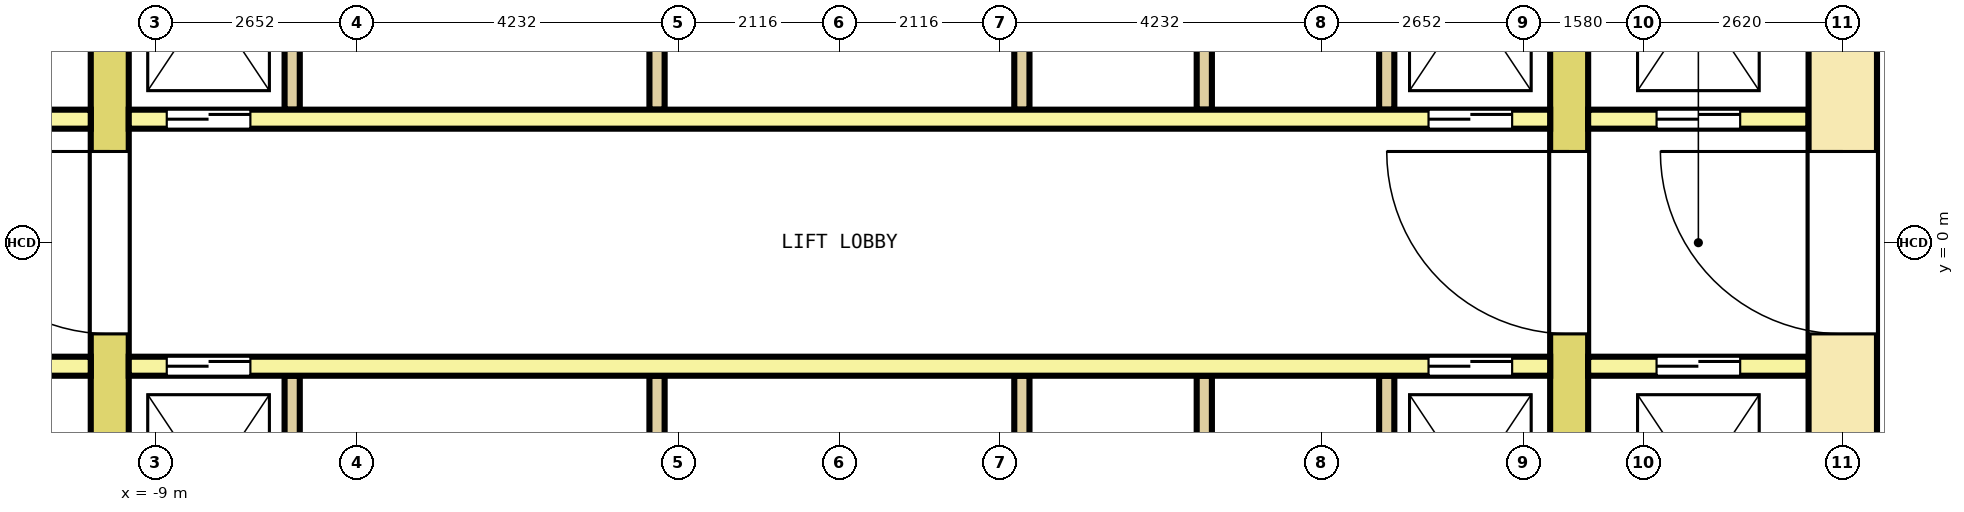
"""IFC4 building model, lengths in metres.
Left out: names, types, materials, properties, quantities, classifications, styles, units other than length and angle.
Written with IfcOpenShell. Run it as: python <this file> out.ifc"""

import sys

from ifc_helpers import new_model, si_unit, direction, frame, frame_2d, origin, place, context, subcontext, project, spatial, rectangle, extrude, element, fill, save


model = new_model("IFC4")
c1 = context("Model", 3, precision=1e-05, world=origin(), true_north=direction((0.0, 1.0)))
c2 = subcontext(c1, "Body", "Model", "MODEL_VIEW")
j1 = project(units=[si_unit("LENGTHUNIT", "METRE"), si_unit("PLANEANGLEUNIT", "RADIAN")], contexts=[c1])
p1 = place(None, origin())
s1 = spatial("IfcSite", under=j1, at=p1, CompositionType="ELEMENT")
p2 = place(p1, origin())
s2 = spatial("IfcBuilding", under=s1, at=p2, CompositionType="ELEMENT")
p3 = place(p2, frame((0.0, 0.0, 54.2)))
s3 = spatial("IfcBuildingStorey", under=s2, at=p3, CompositionType="ELEMENT", Elevation=54.2)
p4 = place(p3, frame((13.2, -10.35, 0.0), z_axis=(0.0, 0.0, 1.0), x_axis=(0.0, 1.0, 0.0)))
e1 = element("IfcWall", 1, at=p4, inside=s3, PredefinedType="SHEAR", context=c2, shape_type="SweptSolid", body=[
    extrude(rectangle(XDim=20.7, YDim=0.9, at=frame_2d((10.35, 0.0))), origin(), (0.0, 0.0, 1.0), 4.1),
])
p5 = place(p4, frame((9.15, 0.0, 0.0)))
e2 = element("IfcOpeningElement", 2, at=p5, cuts=e1, PredefinedType="OPENING", context=c2, shape_type="SweptSolid", body=[
    extrude(rectangle(XDim=2.4, YDim=2.1, at=frame_2d((1.2, 1.05))), frame((0.0, 0.46, 0.0), z_axis=(0.0, -1.0, 0.0), x_axis=(1.0, 0.0, 0.0)), (0.0, 0.0, 1.0), 0.92),
])
p6 = place(p4, frame((16.05, 0.0, 0.0)))
e3 = element("IfcOpeningElement", 3, at=p6, cuts=e1, PredefinedType="OPENING", context=c2, shape_type="SweptSolid", body=[
    extrude(rectangle(XDim=1.2, YDim=2.1, at=frame_2d((0.6, 1.05))), frame((0.0, 0.46, 0.0), z_axis=(0.0, -1.0, 0.0), x_axis=(1.0, 0.0, 0.0)), (0.0, 0.0, 1.0), 0.92),
])
p7 = place(p4, frame((2.819, 0.0, 0.0)))
e4 = element("IfcOpeningElement", 4, at=p7, cuts=e1, PredefinedType="OPENING", context=c2, shape_type="SweptSolid", body=[
    extrude(rectangle(XDim=1.0, YDim=2.1, at=frame_2d((0.5, 1.05))), frame((0.0, 0.46, 0.0), z_axis=(0.0, -1.0, 0.0), x_axis=(1.0, 0.0, 0.0)), (0.0, 0.0, 1.0), 0.92),
])
p8 = place(p4, frame((4.281, 0.0, 0.0)))
e5 = element("IfcOpeningElement", 5, at=p8, cuts=e1, PredefinedType="OPENING", context=c2, shape_type="SweptSolid", body=[
    extrude(rectangle(XDim=1.0, YDim=2.1, at=frame_2d((0.5, 1.05))), frame((0.0, 0.46, 0.0), z_axis=(0.0, -1.0, 0.0), x_axis=(1.0, 0.0, 0.0)), (0.0, 0.0, 1.0), 0.92),
])
p9 = place(p3, frame((-9.6, -7.7, 0.0), z_axis=(0.0, 0.0, 1.0), x_axis=(0.0, 1.0, 0.0)))
e6 = element("IfcWall", 6, at=p9, inside=s3, PredefinedType="SHEAR", context=c2, shape_type="SweptSolid", body=[
    extrude(rectangle(XDim=15.4, YDim=0.5, at=frame_2d((7.7, 0.0))), origin(), (0.0, 0.0, 1.0), 4.1),
])
p10 = place(p9, frame((6.5, 0.0, 0.0)))
e7 = element("IfcOpeningElement", 7, at=p10, cuts=e6, PredefinedType="OPENING", context=c2, shape_type="SweptSolid", body=[
    extrude(rectangle(XDim=2.4, YDim=2.1, at=frame_2d((1.2, 1.05))), frame((0.0, 0.26, 0.0), z_axis=(0.0, -1.0, 0.0), x_axis=(1.0, 0.0, 0.0)), (0.0, 0.0, 1.0), 0.52),
])
p11 = place(p9, frame((13.4, 0.0, 0.0)))
e8 = element("IfcOpeningElement", 8, at=p11, cuts=e6, PredefinedType="OPENING", context=c2, shape_type="SweptSolid", body=[
    extrude(rectangle(XDim=1.2, YDim=2.1, at=frame_2d((0.6, 1.05))), frame((0.0, 0.26, 0.0), z_axis=(0.0, -1.0, 0.0), x_axis=(1.0, 0.0, 0.0)), (0.0, 0.0, 1.0), 0.52),
])
p12 = place(p9, frame((0.8, 0.0, 0.0)))
e9 = element("IfcOpeningElement", 9, at=p12, cuts=e6, PredefinedType="OPENING", context=c2, shape_type="SweptSolid", body=[
    extrude(rectangle(XDim=1.2, YDim=2.1, at=frame_2d((0.6, 1.05))), frame((0.0, 0.26, 0.0), z_axis=(0.0, -1.0, 0.0), x_axis=(1.0, 0.0, 0.0)), (0.0, 0.0, 1.0), 0.52),
])
p13 = place(p3, frame((9.6, -7.7, 0.0), z_axis=(0.0, 0.0, 1.0), x_axis=(0.0, 1.0, 0.0)))
e10 = element("IfcWall", 10, at=p13, inside=s3, PredefinedType="SHEAR", context=c2, shape_type="SweptSolid", body=[
    extrude(rectangle(XDim=15.4, YDim=0.5, at=frame_2d((7.7, 0.0))), origin(), (0.0, 0.0, 1.0), 4.1),
])
p14 = place(p13, frame((6.5, 0.0, 0.0)))
e11 = element("IfcOpeningElement", 11, at=p14, cuts=e10, PredefinedType="OPENING", context=c2, shape_type="SweptSolid", body=[
    extrude(rectangle(XDim=2.4, YDim=2.1, at=frame_2d((1.2, 1.05))), frame((0.0, 0.26, 0.0), z_axis=(0.0, -1.0, 0.0), x_axis=(1.0, 0.0, 0.0)), (0.0, 0.0, 1.0), 0.52),
])
p15 = place(p13, frame((13.4, 0.0, 0.0)))
e12 = element("IfcOpeningElement", 12, at=p15, cuts=e10, PredefinedType="OPENING", context=c2, shape_type="SweptSolid", body=[
    extrude(rectangle(XDim=1.2, YDim=2.1, at=frame_2d((0.6, 1.05))), frame((0.0, 0.26, 0.0), z_axis=(0.0, -1.0, 0.0), x_axis=(1.0, 0.0, 0.0)), (0.0, 0.0, 1.0), 0.52),
])
p16 = place(p13, frame((0.9, 0.0, 0.0)))
e13 = element("IfcOpeningElement", 13, at=p16, cuts=e10, PredefinedType="OPENING", context=c2, shape_type="SweptSolid", body=[
    extrude(rectangle(XDim=1.0, YDim=2.1, at=frame_2d((0.5, 1.05))), frame((0.0, 0.26, 0.0), z_axis=(0.0, -1.0, 0.0), x_axis=(1.0, 0.0, 0.0)), (0.0, 0.0, 1.0), 0.52),
])
p17 = place(p3, frame((-12.75, 1.625, 0.0), z_axis=(0.0, 0.0, 1.0), x_axis=(1.0, 0.0, 0.0)))
e14 = element("IfcWall", 14, at=p17, inside=s3, PredefinedType="SOLIDWALL", context=c2, shape_type="SweptSolid", body=[
    extrude(rectangle(XDim=2.9, YDim=0.25, at=frame_2d((1.45, 0.0))), origin(), (0.0, 0.0, 1.0), 4.1),
])
p18 = place(p17, frame((0.9, 0.0, 0.0)))
e15 = element("IfcOpeningElement", 15, at=p18, cuts=e14, PredefinedType="OPENING", context=c2, shape_type="SweptSolid", body=[
    extrude(rectangle(XDim=1.1, YDim=2.1, at=frame_2d((0.55, 1.05))), frame((0.0, 0.135, 0.0), z_axis=(0.0, -1.0, 0.0), x_axis=(1.0, 0.0, 0.0)), (0.0, 0.0, 1.0), 0.27),
])
p19 = place(p3, frame((-9.35, 1.625, 0.0), z_axis=(0.0, 0.0, 1.0), x_axis=(1.0, 0.0, 0.0)))
e16 = element("IfcWall", 16, at=p19, inside=s3, PredefinedType="SOLIDWALL", context=c2, shape_type="SweptSolid", body=[
    extrude(rectangle(XDim=18.7, YDim=0.25, at=frame_2d((9.35, 0.0))), origin(), (0.0, 0.0, 1.0), 4.1),
])
p20 = place(p19, frame((0.5, 0.0, 0.0)))
e17 = element("IfcOpeningElement", 17, at=p20, cuts=e16, PredefinedType="OPENING", context=c2, shape_type="SweptSolid", body=[
    extrude(rectangle(XDim=1.1, YDim=2.1, at=frame_2d((0.55, 1.05))), frame((0.0, 0.135, 0.0), z_axis=(0.0, -1.0, 0.0), x_axis=(1.0, 0.0, 0.0)), (0.0, 0.0, 1.0), 0.27),
])
p21 = place(p19, frame((17.1, 0.0, 0.0)))
e18 = element("IfcOpeningElement", 18, at=p21, cuts=e16, PredefinedType="OPENING", context=c2, shape_type="SweptSolid", body=[
    extrude(rectangle(XDim=1.1, YDim=2.1, at=frame_2d((0.55, 1.05))), frame((0.0, 0.135, 0.0), z_axis=(0.0, -1.0, 0.0), x_axis=(1.0, 0.0, 0.0)), (0.0, 0.0, 1.0), 0.27),
])
p22 = place(p3, frame((9.85, 1.625, 0.0), z_axis=(0.0, 0.0, 1.0), x_axis=(1.0, 0.0, 0.0)))
e19 = element("IfcWall", 19, at=p22, inside=s3, PredefinedType="SOLIDWALL", context=c2, shape_type="SweptSolid", body=[
    extrude(rectangle(XDim=2.9, YDim=0.25, at=frame_2d((1.45, 0.0))), origin(), (0.0, 0.0, 1.0), 4.1),
])
p23 = place(p22, frame((0.9, 0.0, 0.0)))
e20 = element("IfcOpeningElement", 20, at=p23, cuts=e19, PredefinedType="OPENING", context=c2, shape_type="SweptSolid", body=[
    extrude(rectangle(XDim=1.1, YDim=2.1, at=frame_2d((0.55, 1.05))), frame((0.0, 0.135, 0.0), z_axis=(0.0, -1.0, 0.0), x_axis=(1.0, 0.0, 0.0)), (0.0, 0.0, 1.0), 0.27),
])
for number, where, z_axis, x_axis in (
    (21, (-7.2, 1.75, 0.0), (0.0, 0.0, 1.0), (0.0, 1.0, 0.0)),
    (22, (-2.4, 1.75, 0.0), (0.0, 0.0, 1.0), (0.0, 1.0, 0.0)),
    (23, (2.4, 1.75, 0.0), (0.0, 0.0, 1.0), (0.0, 1.0, 0.0)),
    (24, (4.8, 1.75, 0.0), (0.0, 0.0, 1.0), (0.0, 1.0, 0.0)),
    (25, (7.2, 1.75, 0.0), (0.0, 0.0, 1.0), (0.0, 1.0, 0.0)),
):
    element("IfcWall", number, at=place(p3, frame(where, z_axis=z_axis, x_axis=x_axis)), inside=s3, PredefinedType="SOLIDWALL", context=c2, shape_type="SweptSolid", body=[
        extrude(rectangle(XDim=2.9, YDim=0.2, at=frame_2d((1.45, 0.0))), origin(), (0.0, 0.0, 1.0), 4.1),
    ])
p24 = place(p3, frame((-12.75, -1.625, 0.0), z_axis=(0.0, 0.0, 1.0), x_axis=(1.0, 0.0, 0.0)))
e26 = element("IfcWall", 26, at=p24, inside=s3, PredefinedType="SOLIDWALL", context=c2, shape_type="SweptSolid", body=[
    extrude(rectangle(XDim=2.9, YDim=0.25, at=frame_2d((1.45, 0.0))), origin(), (0.0, 0.0, 1.0), 4.1),
])
p25 = place(p24, frame((0.9, 0.0, 0.0)))
e27 = element("IfcOpeningElement", 27, at=p25, cuts=e26, PredefinedType="OPENING", context=c2, shape_type="SweptSolid", body=[
    extrude(rectangle(XDim=1.1, YDim=2.1, at=frame_2d((0.55, 1.05))), frame((0.0, 0.135, 0.0), z_axis=(0.0, -1.0, 0.0), x_axis=(1.0, 0.0, 0.0)), (0.0, 0.0, 1.0), 0.27),
])
p26 = place(p3, frame((-9.35, -1.625, 0.0), z_axis=(0.0, 0.0, 1.0), x_axis=(1.0, 0.0, 0.0)))
e28 = element("IfcWall", 28, at=p26, inside=s3, PredefinedType="SOLIDWALL", context=c2, shape_type="SweptSolid", body=[
    extrude(rectangle(XDim=18.7, YDim=0.25, at=frame_2d((9.35, 0.0))), origin(), (0.0, 0.0, 1.0), 4.1),
])
p27 = place(p26, frame((0.5, 0.0, 0.0)))
e29 = element("IfcOpeningElement", 29, at=p27, cuts=e28, PredefinedType="OPENING", context=c2, shape_type="SweptSolid", body=[
    extrude(rectangle(XDim=1.1, YDim=2.1, at=frame_2d((0.55, 1.05))), frame((0.0, 0.135, 0.0), z_axis=(0.0, -1.0, 0.0), x_axis=(1.0, 0.0, 0.0)), (0.0, 0.0, 1.0), 0.27),
])
p28 = place(p26, frame((17.1, 0.0, 0.0)))
e30 = element("IfcOpeningElement", 30, at=p28, cuts=e28, PredefinedType="OPENING", context=c2, shape_type="SweptSolid", body=[
    extrude(rectangle(XDim=1.1, YDim=2.1, at=frame_2d((0.55, 1.05))), frame((0.0, 0.135, 0.0), z_axis=(0.0, -1.0, 0.0), x_axis=(1.0, 0.0, 0.0)), (0.0, 0.0, 1.0), 0.27),
])
p29 = place(p3, frame((9.85, -1.625, 0.0), z_axis=(0.0, 0.0, 1.0), x_axis=(1.0, 0.0, 0.0)))
e31 = element("IfcWall", 31, at=p29, inside=s3, PredefinedType="SOLIDWALL", context=c2, shape_type="SweptSolid", body=[
    extrude(rectangle(XDim=2.9, YDim=0.25, at=frame_2d((1.45, 0.0))), origin(), (0.0, 0.0, 1.0), 4.1),
])
p30 = place(p29, frame((0.9, 0.0, 0.0)))
e32 = element("IfcOpeningElement", 32, at=p30, cuts=e31, PredefinedType="OPENING", context=c2, shape_type="SweptSolid", body=[
    extrude(rectangle(XDim=1.1, YDim=2.1, at=frame_2d((0.55, 1.05))), frame((0.0, 0.135, 0.0), z_axis=(0.0, -1.0, 0.0), x_axis=(1.0, 0.0, 0.0)), (0.0, 0.0, 1.0), 0.27),
])
for number, where, z_axis, x_axis in (
    (33, (-7.2, -4.65, 0.0), (0.0, 0.0, 1.0), (0.0, 1.0, 0.0)),
    (34, (-2.4, -4.65, 0.0), (0.0, 0.0, 1.0), (0.0, 1.0, 0.0)),
    (35, (2.4, -4.65, 0.0), (0.0, 0.0, 1.0), (0.0, 1.0, 0.0)),
    (36, (4.8, -4.65, 0.0), (0.0, 0.0, 1.0), (0.0, 1.0, 0.0)),
    (37, (7.2, -4.65, 0.0), (0.0, 0.0, 1.0), (0.0, 1.0, 0.0)),
):
    element("IfcWall", number, at=place(p3, frame(where, z_axis=z_axis, x_axis=x_axis)), inside=s3, PredefinedType="SOLIDWALL", context=c2, shape_type="SweptSolid", body=[
        extrude(rectangle(XDim=2.9, YDim=0.2, at=frame_2d((1.45, 0.0))), origin(), (0.0, 0.0, 1.0), 4.1),
    ])
p31 = place(p20, origin())
e38 = element("IfcDoor", 38, at=p31, inside=s3, OperationType="DOUBLE_DOOR_SLIDING", PredefinedType="DOOR", context=c2, shape_type="SweptSolid", body=[
    extrude(rectangle(XDim=1.1, YDim=2.1, at=frame_2d((0.55, 1.05))), frame((0.0, 0.075, 0.0), z_axis=(0.0, -1.0, 0.0), x_axis=(1.0, 0.0, 0.0)), (0.0, 0.0, 1.0), 0.15),
])
fill(e17, e38)
p32 = place(p21, origin())
e39 = element("IfcDoor", 39, at=p32, inside=s3, OperationType="DOUBLE_DOOR_SLIDING", PredefinedType="DOOR", context=c2, shape_type="SweptSolid", body=[
    extrude(rectangle(XDim=1.1, YDim=2.1, at=frame_2d((0.55, 1.05))), frame((0.0, 0.075, 0.0), z_axis=(0.0, -1.0, 0.0), x_axis=(1.0, 0.0, 0.0)), (0.0, 0.0, 1.0), 0.15),
])
fill(e18, e39)
p33 = place(p23, origin())
e40 = element("IfcDoor", 40, at=p33, inside=s3, OperationType="DOUBLE_DOOR_SLIDING", PredefinedType="DOOR", context=c2, shape_type="SweptSolid", body=[
    extrude(rectangle(XDim=1.1, YDim=2.1, at=frame_2d((0.55, 1.05))), frame((0.0, 0.075, 0.0), z_axis=(0.0, -1.0, 0.0), x_axis=(1.0, 0.0, 0.0)), (0.0, 0.0, 1.0), 0.15),
])
fill(e20, e40)
p34 = place(p27, origin())
e41 = element("IfcDoor", 41, at=p34, inside=s3, OperationType="DOUBLE_DOOR_SLIDING", PredefinedType="DOOR", context=c2, shape_type="SweptSolid", body=[
    extrude(rectangle(XDim=1.1, YDim=2.1, at=frame_2d((0.55, 1.05))), frame((0.0, 0.075, 0.0), z_axis=(0.0, -1.0, 0.0), x_axis=(1.0, 0.0, 0.0)), (0.0, 0.0, 1.0), 0.15),
])
fill(e29, e41)
p35 = place(p28, origin())
e42 = element("IfcDoor", 42, at=p35, inside=s3, OperationType="DOUBLE_DOOR_SLIDING", PredefinedType="DOOR", context=c2, shape_type="SweptSolid", body=[
    extrude(rectangle(XDim=1.1, YDim=2.1, at=frame_2d((0.55, 1.05))), frame((0.0, 0.075, 0.0), z_axis=(0.0, -1.0, 0.0), x_axis=(1.0, 0.0, 0.0)), (0.0, 0.0, 1.0), 0.15),
])
fill(e30, e42)
p36 = place(p30, origin())
e43 = element("IfcDoor", 43, at=p36, inside=s3, OperationType="DOUBLE_DOOR_SLIDING", PredefinedType="DOOR", context=c2, shape_type="SweptSolid", body=[
    extrude(rectangle(XDim=1.1, YDim=2.1, at=frame_2d((0.55, 1.05))), frame((0.0, 0.075, 0.0), z_axis=(0.0, -1.0, 0.0), x_axis=(1.0, 0.0, 0.0)), (0.0, 0.0, 1.0), 0.15),
])
fill(e32, e43)
p37 = place(p10, origin())
e44 = element("IfcDoor", 44, at=p37, inside=s3, OperationType="DOUBLE_DOOR_SINGLE_SWING", PredefinedType="DOOR", context=c2, shape_type="SweptSolid", body=[
    extrude(rectangle(XDim=2.4, YDim=2.1, at=frame_2d((1.2, 1.05))), frame((0.0, 0.2, 0.0), z_axis=(0.0, -1.0, 0.0), x_axis=(1.0, 0.0, 0.0)), (0.0, 0.0, 1.0), 0.4),
])
fill(e7, e44)
p38 = place(p14, origin())
e45 = element("IfcDoor", 45, at=p38, inside=s3, OperationType="DOUBLE_DOOR_SINGLE_SWING", PredefinedType="DOOR", context=c2, shape_type="SweptSolid", body=[
    extrude(rectangle(XDim=2.4, YDim=2.1, at=frame_2d((1.2, 1.05))), frame((0.0, 0.2, 0.0), z_axis=(0.0, -1.0, 0.0), x_axis=(1.0, 0.0, 0.0)), (0.0, 0.0, 1.0), 0.4),
])
fill(e11, e45)
p39 = place(p5, origin())
e46 = element("IfcDoor", 46, at=p39, inside=s3, OperationType="DOUBLE_DOOR_SINGLE_SWING", PredefinedType="DOOR", context=c2, shape_type="SweptSolid", body=[
    extrude(rectangle(XDim=2.4, YDim=2.1, at=frame_2d((1.2, 1.05))), frame((0.0, 0.3, 0.0), z_axis=(0.0, -1.0, 0.0), x_axis=(1.0, 0.0, 0.0)), (0.0, 0.0, 1.0), 0.6),
])
fill(e2, e46)
save(model, sys.argv[1])
